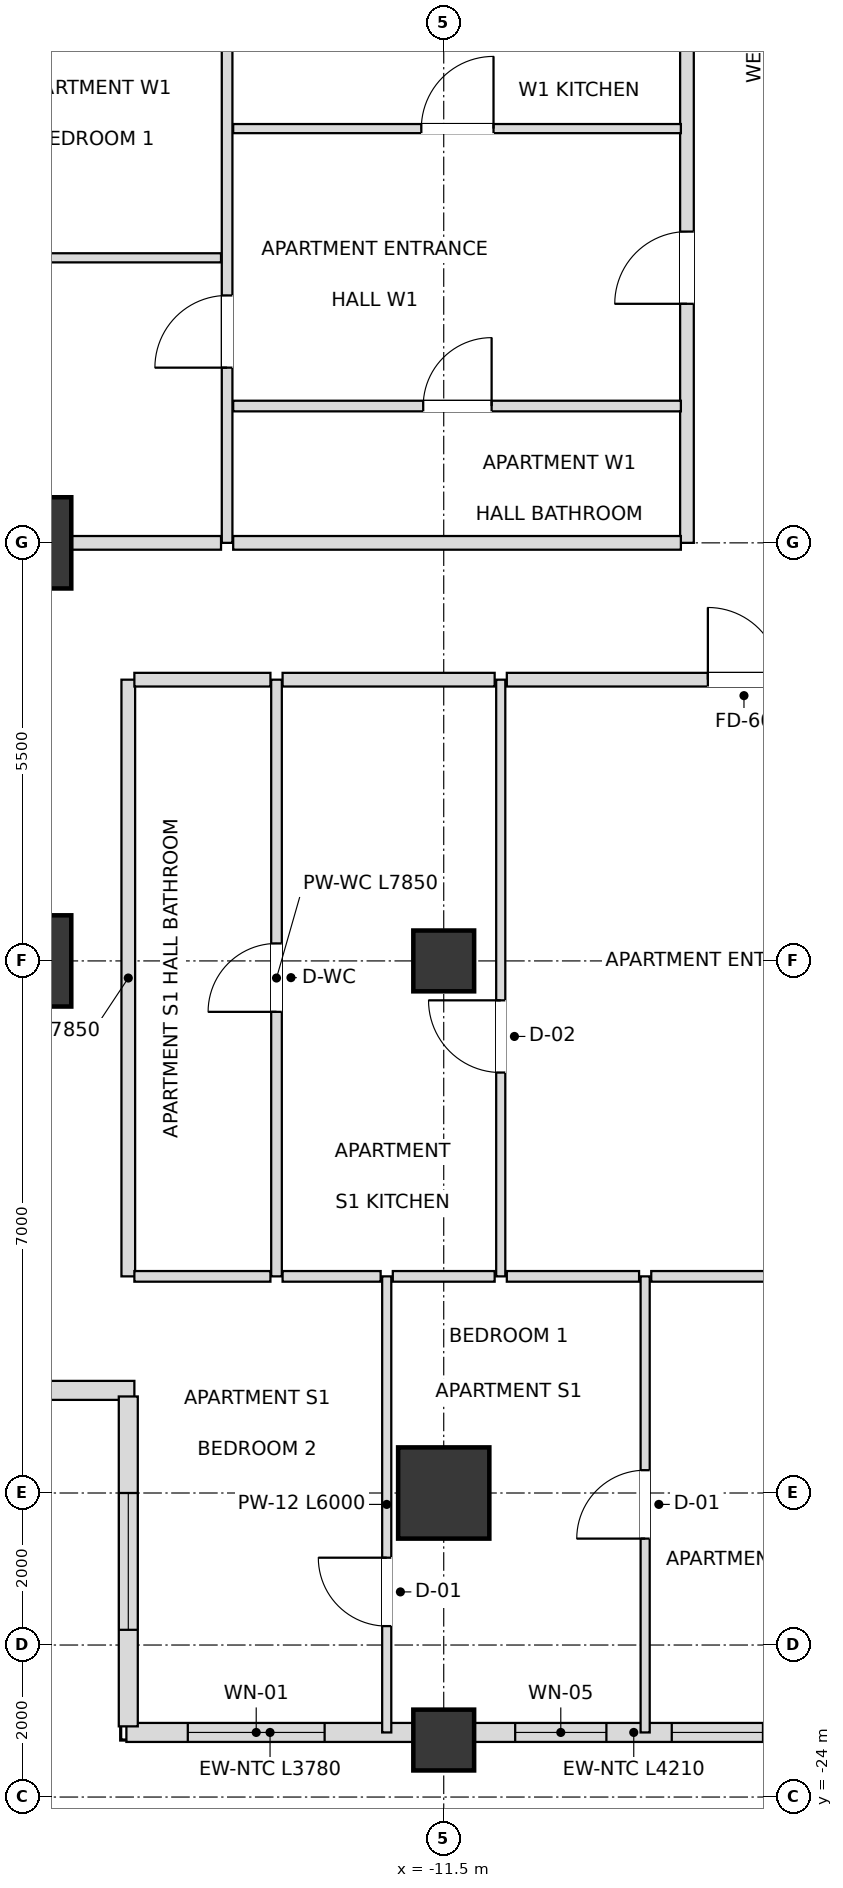
"""IFC4 building model, lengths in metres.
Left out: names, types, materials, properties, quantities, classifications, styles, units other than length and angle.
Written with IfcOpenShell. Run it as: python <this file> out.ifc"""

import sys

from ifc_helpers import new_model, si_unit, direction, frame, frame_2d, origin, origin_2d, place, context, subcontext, project, spatial, rectangle, extrude, element, fill, save


model = new_model("IFC4")
c1 = context("Model", 3, precision=1e-05, world=origin(), true_north=direction((0.0, 1.0)))
c2 = subcontext(c1, "Body", "Model", "MODEL_VIEW")
j1 = project(units=[si_unit("LENGTHUNIT", "METRE"), si_unit("PLANEANGLEUNIT", "RADIAN")], contexts=[c1])
p1 = place(None, origin())
s1 = spatial("IfcSite", under=j1, at=p1, CompositionType="ELEMENT")
p2 = place(p1, origin())
s2 = spatial("IfcBuilding", under=s1, at=p2, CompositionType="ELEMENT")
p3 = place(p2, frame((0.0, 0.0, 117.0)))
s3 = spatial("IfcBuildingStorey", under=s2, at=p3, CompositionType="ELEMENT", Elevation=117.0)
for number, where, z_axis, x_axis in (
    (1, (-11.5, -20.0, 0.0), (0.0, 0.0, 1.0), (1.0, 0.0, 0.0)),
    (2, (-17.0, -7.5, 0.0), (0.0, 0.0, 1.0), (1.0, 0.0, 0.0)),
    (3, (-17.0, -13.0, 0.0), (0.0, 0.0, 1.0), (1.0, 0.0, 0.0)),
):
    element("IfcColumn", number, at=place(p3, frame(where, z_axis=z_axis, x_axis=x_axis)), inside=s3, PredefinedType="USERDEFINED", context=c2, shape_type="SweptSolid", body=[
        extrude(rectangle(XDim=1.2, YDim=1.2, at=origin_2d()), origin(), (0.0, 0.0, 1.0), 3.6),
    ])
for number, where, z_axis, x_axis in (
    (4, (-11.5, -13.0, 0.0), (0.0, 0.0, 1.0), (1.0, 0.0, 0.0)),
    (5, (-11.5, -23.25, 0.0), (0.0, 0.0, 1.0), (1.0, 0.0, 0.0)),
):
    element("IfcColumn", number, at=place(p3, frame(where, z_axis=z_axis, x_axis=x_axis)), inside=s3, PredefinedType="COLUMN", context=c2, shape_type="SweptSolid", body=[
        extrude(rectangle(XDim=0.8, YDim=0.8, at=origin_2d()), origin(), (0.0, 0.0, 1.0), 3.6),
    ])
p4 = place(p3, frame((-15.675, -23.15, 0.0), z_axis=(0.0, 0.0, 1.0), x_axis=(1.0, 0.0, 0.0)))
e6 = element("IfcWall", 6, at=p4, inside=s3, PredefinedType="SOLIDWALL", context=c2, shape_type="SweptSolid", body=[
    extrude(rectangle(XDim=3.78, YDim=0.25, at=frame_2d((1.89, 0.0))), origin(), (0.0, 0.0, 1.0), 2.656),
])
p5 = place(p4, frame((0.808, 0.0, 0.72)))
e7 = element("IfcOpeningElement", 7, at=p5, cuts=e6, PredefinedType="OPENING", context=c2, shape_type="SweptSolid", body=[
    extrude(rectangle(XDim=1.8, YDim=1.68, at=frame_2d((0.9, 0.84))), frame((0.0, 0.135, 0.0), z_axis=(0.0, -1.0, 0.0), x_axis=(1.0, 0.0, 0.0)), (0.0, 0.0, 1.0), 0.27),
])
p6 = place(p3, frame((-11.105, -23.15, 0.0), z_axis=(0.0, 0.0, 1.0), x_axis=(1.0, 0.0, 0.0)))
e8 = element("IfcWall", 8, at=p6, inside=s3, PredefinedType="SOLIDWALL", context=c2, shape_type="SweptSolid", body=[
    extrude(rectangle(XDim=4.21, YDim=0.25, at=frame_2d((2.105, 0.0))), origin(), (0.0, 0.0, 1.0), 2.656),
])
p7 = place(p6, frame((0.545, 0.0, 0.72)))
e9 = element("IfcOpeningElement", 9, at=p7, cuts=e8, PredefinedType="OPENING", context=c2, shape_type="SweptSolid", body=[
    extrude(rectangle(XDim=1.2, YDim=1.68, at=frame_2d((0.6, 0.84))), frame((0.0, 0.135, 0.0), z_axis=(0.0, -1.0, 0.0), x_axis=(1.0, 0.0, 0.0)), (0.0, 0.0, 1.0), 0.27),
])
p8 = place(p6, frame((2.605, 0.0, 0.72)))
e10 = element("IfcOpeningElement", 10, at=p8, cuts=e8, PredefinedType="OPENING", context=c2, shape_type="SweptSolid", body=[
    extrude(rectangle(XDim=1.2, YDim=1.68, at=frame_2d((0.6, 0.84))), frame((0.0, 0.135, 0.0), z_axis=(0.0, -1.0, 0.0), x_axis=(1.0, 0.0, 0.0)), (0.0, 0.0, 1.0), 0.27),
])
p9 = place(p3, frame((-20.23, -18.65, 0.0), z_axis=(0.0, 0.0, 1.0), x_axis=(1.0, 0.0, 0.0)))
e11 = element("IfcWall", 11, at=p9, inside=s3, PredefinedType="SOLIDWALL", context=c2, shape_type="SweptSolid", body=[
    extrude(rectangle(XDim=4.66, YDim=0.25, at=frame_2d((2.33, 0.0))), origin(), (0.0, 0.0, 1.0), 2.656),
])
p10 = place(p9, frame((1.43, 0.0, 0.72)))
e12 = element("IfcOpeningElement", 12, at=p10, cuts=e11, PredefinedType="OPENING", context=c2, shape_type="SweptSolid", body=[
    extrude(rectangle(XDim=1.8, YDim=1.68, at=frame_2d((0.9, 0.84))), frame((0.0, 0.135, 0.0), z_axis=(0.0, -1.0, 0.0), x_axis=(1.0, 0.0, 0.0)), (0.0, 0.0, 1.0), 0.27),
])
p11 = place(p3, frame((-15.65, -18.73, 0.0), z_axis=(0.0, 0.0, 1.0), x_axis=(0.0, -1.0, 0.0)))
e13 = element("IfcWall", 13, at=p11, inside=s3, PredefinedType="SOLIDWALL", context=c2, shape_type="SweptSolid", body=[
    extrude(rectangle(XDim=4.34, YDim=0.25, at=frame_2d((2.17, 0.0))), origin(), (0.0, 0.0, 1.0), 2.656),
])
p12 = place(p11, frame((1.27, 0.0, 0.72)))
e14 = element("IfcOpeningElement", 14, at=p12, cuts=e13, PredefinedType="OPENING", context=c2, shape_type="SweptSolid", body=[
    extrude(rectangle(XDim=1.8, YDim=1.68, at=frame_2d((0.9, 0.84))), frame((0.0, 0.135, 0.0), z_axis=(0.0, -1.0, 0.0), x_axis=(1.0, 0.0, 0.0)), (0.0, 0.0, 1.0), 0.27),
])
p13 = place(p3, frame((-15.65, -17.15, 0.0), z_axis=(0.0, 0.0, 1.0), x_axis=(0.0, 1.0, 0.0)))
e15 = element("IfcWall", 15, at=p13, inside=s3, PredefinedType="PARTITIONING", context=c2, shape_type="SweptSolid", body=[
    extrude(rectangle(XDim=7.85, YDim=0.18, at=frame_2d((3.925, 0.0))), origin(), (0.0, 0.0, 1.0), 2.656),
])
p14 = place(p3, frame((-14.35, -7.5, 0.0), z_axis=(0.0, 0.0, 1.0), x_axis=(0.0, 1.0, 0.0)))
e16 = element("IfcWall", 16, at=p14, inside=s3, PredefinedType="PARTITIONING", context=c2, shape_type="SweptSolid", body=[
    extrude(rectangle(XDim=15.0, YDim=0.14, at=frame_2d((7.5, 0.0))), origin(), (0.0, 0.0, 1.0), 3.3),
])
p15 = place(p14, frame((2.305, 0.0, 0.0)))
e17 = element("IfcOpeningElement", 17, at=p15, cuts=e16, PredefinedType="OPENING", context=c2, shape_type="SweptSolid", body=[
    extrude(rectangle(XDim=0.95, YDim=2.1, at=frame_2d((0.475, 1.05))), frame((0.0, 0.08, 0.0), z_axis=(0.0, -1.0, 0.0), x_axis=(1.0, 0.0, 0.0)), (0.0, 0.0, 1.0), 0.16),
])
p16 = place(p14, frame((9.795, 0.0, 0.0)))
e18 = element("IfcOpeningElement", 18, at=p16, cuts=e16, PredefinedType="OPENING", context=c2, shape_type="SweptSolid", body=[
    extrude(rectangle(XDim=0.95, YDim=2.1, at=frame_2d((0.475, 1.05))), frame((0.0, 0.08, 0.0), z_axis=(0.0, -1.0, 0.0), x_axis=(1.0, 0.0, 0.0)), (0.0, 0.0, 1.0), 0.16),
])
p17 = place(p3, frame((-13.7, -17.15, 0.0), z_axis=(0.0, 0.0, 1.0), x_axis=(0.0, 1.0, 0.0)))
e19 = element("IfcWall", 19, at=p17, inside=s3, PredefinedType="PARTITIONING", context=c2, shape_type="SweptSolid", body=[
    extrude(rectangle(XDim=7.85, YDim=0.14, at=frame_2d((3.925, 0.0))), origin(), (0.0, 0.0, 1.0), 2.656),
])
p18 = place(p17, frame((3.48, 0.0, 0.0)))
e20 = element("IfcOpeningElement", 20, at=p18, cuts=e19, PredefinedType="OPENING", context=c2, shape_type="SweptSolid", body=[
    extrude(rectangle(XDim=0.9, YDim=2.1, at=frame_2d((0.45, 1.05))), frame((0.0, 0.08, 0.0), z_axis=(0.0, -1.0, 0.0), x_axis=(1.0, 0.0, 0.0)), (0.0, 0.0, 1.0), 0.16),
])
p19 = place(p3, frame((-12.25, -23.15, 0.0), z_axis=(0.0, 0.0, 1.0), x_axis=(0.0, 1.0, 0.0)))
e21 = element("IfcWall", 21, at=p19, inside=s3, PredefinedType="PARTITIONING", context=c2, shape_type="SweptSolid", body=[
    extrude(rectangle(XDim=6.0, YDim=0.12, at=frame_2d((3.0, 0.0))), origin(), (0.0, 0.0, 1.0), 2.656),
])
p20 = place(p19, frame((1.399, 0.0, 0.0)))
e22 = element("IfcOpeningElement", 22, at=p20, cuts=e21, PredefinedType="OPENING", context=c2, shape_type="SweptSolid", body=[
    extrude(rectangle(XDim=0.9, YDim=2.1, at=frame_2d((0.45, 1.05))), frame((0.0, 0.07, 0.0), z_axis=(0.0, -1.0, 0.0), x_axis=(1.0, 0.0, 0.0)), (0.0, 0.0, 1.0), 0.14),
])
p21 = place(p3, frame((-10.75, -17.15, 0.0), z_axis=(0.0, 0.0, 1.0), x_axis=(0.0, 1.0, 0.0)))
e23 = element("IfcWall", 23, at=p21, inside=s3, PredefinedType="PARTITIONING", context=c2, shape_type="SweptSolid", body=[
    extrude(rectangle(XDim=7.85, YDim=0.12, at=frame_2d((3.925, 0.0))), origin(), (0.0, 0.0, 1.0), 2.736),
])
p22 = place(p21, frame((2.681, 0.0, 0.0)))
e24 = element("IfcOpeningElement", 24, at=p22, cuts=e23, PredefinedType="OPENING", context=c2, shape_type="SweptSolid", body=[
    extrude(rectangle(XDim=0.95, YDim=2.1, at=frame_2d((0.475, 1.05))), frame((0.0, 0.07, 0.0), z_axis=(0.0, -1.0, 0.0), x_axis=(1.0, 0.0, 0.0)), (0.0, 0.0, 1.0), 0.14),
])
p23 = place(p3, frame((-8.85, -23.15, 0.0), z_axis=(0.0, 0.0, 1.0), x_axis=(0.0, 1.0, 0.0)))
e25 = element("IfcWall", 25, at=p23, inside=s3, PredefinedType="PARTITIONING", context=c2, shape_type="SweptSolid", body=[
    extrude(rectangle(XDim=6.0, YDim=0.12, at=frame_2d((3.0, 0.0))), origin(), (0.0, 0.0, 1.0), 2.736),
])
p24 = place(p23, frame((2.55, 0.0, 0.0)))
e26 = element("IfcOpeningElement", 26, at=p24, cuts=e25, PredefinedType="OPENING", context=c2, shape_type="SweptSolid", body=[
    extrude(rectangle(XDim=0.9, YDim=2.1, at=frame_2d((0.45, 1.05))), frame((0.0, 0.07, 0.0), z_axis=(0.0, -1.0, 0.0), x_axis=(1.0, 0.0, 0.0)), (0.0, 0.0, 1.0), 0.14),
])
p25 = place(p3, frame((-8.3, -7.5, 0.0), z_axis=(0.0, 0.0, 1.0), x_axis=(0.0, 1.0, 0.0)))
e27 = element("IfcWall", 27, at=p25, inside=s3, PredefinedType="PARTITIONING", context=c2, shape_type="SweptSolid", body=[
    extrude(rectangle(XDim=15.0, YDim=0.18, at=frame_2d((7.5, 0.0))), origin(), (0.0, 0.0, 1.0), 3.3),
])
p26 = place(p25, frame((3.145, 0.0, 0.0)))
e28 = element("IfcOpeningElement", 28, at=p26, cuts=e27, PredefinedType="OPENING", context=c2, shape_type="SweptSolid", body=[
    extrude(rectangle(XDim=0.95, YDim=2.15, at=frame_2d((0.475, 1.075))), frame((0.0, 0.1, 0.0), z_axis=(0.0, -1.0, 0.0), x_axis=(1.0, 0.0, 0.0)), (0.0, 0.0, 1.0), 0.2),
])
p27 = place(p25, frame((10.645, 0.0, 0.0)))
e29 = element("IfcOpeningElement", 29, at=p27, cuts=e27, PredefinedType="OPENING", context=c2, shape_type="SweptSolid", body=[
    extrude(rectangle(XDim=0.95, YDim=2.15, at=frame_2d((0.475, 1.075))), frame((0.0, 0.1, 0.0), z_axis=(0.0, -1.0, 0.0), x_axis=(1.0, 0.0, 0.0)), (0.0, 0.0, 1.0), 0.2),
])
p28 = place(p3, frame((-15.57, -17.15, 0.0), z_axis=(0.0, 0.0, 1.0), x_axis=(1.0, 0.0, 0.0)))
e30 = element("IfcWall", 30, at=p28, inside=s3, PredefinedType="PARTITIONING", context=c2, shape_type="SweptSolid", body=[
    extrude(rectangle(XDim=1.79, YDim=0.14, at=frame_2d((0.895, 0.0))), origin(), (0.0, 0.0, 1.0), 2.656),
])
p29 = place(p3, frame((-13.62, -17.15, 0.0), z_axis=(0.0, 0.0, 1.0), x_axis=(1.0, 0.0, 0.0)))
e31 = element("IfcWall", 31, at=p29, inside=s3, PredefinedType="PARTITIONING", context=c2, shape_type="SweptSolid", body=[
    extrude(rectangle(XDim=1.29, YDim=0.14, at=frame_2d((0.645, 0.0))), origin(), (0.0, 0.0, 1.0), 2.656),
])
p30 = place(p3, frame((-12.17, -17.15, 0.0), z_axis=(0.0, 0.0, 1.0), x_axis=(1.0, 0.0, 0.0)))
e32 = element("IfcWall", 32, at=p30, inside=s3, PredefinedType="PARTITIONING", context=c2, shape_type="SweptSolid", body=[
    extrude(rectangle(XDim=1.34, YDim=0.14, at=frame_2d((0.67, 0.0))), origin(), (0.0, 0.0, 1.0), 2.656),
])
p31 = place(p3, frame((-10.67, -17.15, 0.0), z_axis=(0.0, 0.0, 1.0), x_axis=(1.0, 0.0, 0.0)))
e33 = element("IfcWall", 33, at=p31, inside=s3, PredefinedType="PARTITIONING", context=c2, shape_type="SweptSolid", body=[
    extrude(rectangle(XDim=1.74, YDim=0.14, at=frame_2d((0.87, 0.0))), origin(), (0.0, 0.0, 1.0), 3.3),
])
p32 = place(p3, frame((-8.77, -17.15, 0.0), z_axis=(0.0, 0.0, 1.0), x_axis=(1.0, 0.0, 0.0)))
e34 = element("IfcWall", 34, at=p32, inside=s3, PredefinedType="PARTITIONING", context=c2, shape_type="SweptSolid", body=[
    extrude(rectangle(XDim=4.34, YDim=0.14, at=frame_2d((2.17, 0.0))), origin(), (0.0, 0.0, 1.0), 2.736),
])
p33 = place(p32, frame((1.695, 0.0, 0.0)))
e35 = element("IfcOpeningElement", 35, at=p33, cuts=e34, PredefinedType="OPENING", context=c2, shape_type="SweptSolid", body=[
    extrude(rectangle(XDim=0.95, YDim=2.1, at=frame_2d((0.475, 1.05))), frame((0.0, 0.08, 0.0), z_axis=(0.0, -1.0, 0.0), x_axis=(1.0, 0.0, 0.0)), (0.0, 0.0, 1.0), 0.16),
])
p34 = place(p3, frame((-15.57, -9.3, 0.0), z_axis=(0.0, 0.0, 1.0), x_axis=(1.0, 0.0, 0.0)))
e36 = element("IfcWall", 36, at=p34, inside=s3, PredefinedType="PARTITIONING", context=c2, shape_type="SweptSolid", body=[
    extrude(rectangle(XDim=1.79, YDim=0.18, at=frame_2d((0.895, 0.0))), origin(), (0.0, 0.0, 1.0), 3.3),
])
p35 = place(p3, frame((-13.62, -9.3, 0.0), z_axis=(0.0, 0.0, 1.0), x_axis=(1.0, 0.0, 0.0)))
e37 = element("IfcWall", 37, at=p35, inside=s3, PredefinedType="PARTITIONING", context=c2, shape_type="SweptSolid", body=[
    extrude(rectangle(XDim=2.79, YDim=0.18, at=frame_2d((1.395, 0.0))), origin(), (0.0, 0.0, 1.0), 3.3),
])
p36 = place(p3, frame((-10.67, -9.3, 0.0), z_axis=(0.0, 0.0, 1.0), x_axis=(1.0, 0.0, 0.0)))
e38 = element("IfcWall", 38, at=p36, inside=s3, PredefinedType="PARTITIONING", context=c2, shape_type="SweptSolid", body=[
    extrude(rectangle(XDim=6.24, YDim=0.18, at=frame_2d((3.12, 0.0))), origin(), (0.0, 0.0, 1.0), 2.736),
])
p37 = place(p36, frame((2.645, 0.0, 0.0)))
e39 = element("IfcOpeningElement", 39, at=p37, cuts=e38, PredefinedType="OPENING", context=c2, shape_type="SweptSolid", body=[
    extrude(rectangle(XDim=0.95, YDim=2.15, at=frame_2d((0.475, 1.075))), frame((0.0, 0.1, 0.0), z_axis=(0.0, -1.0, 0.0), x_axis=(1.0, 0.0, 0.0)), (0.0, 0.0, 1.0), 0.2),
])
p38 = place(p3, frame((-20.15, -7.5, 0.0), z_axis=(0.0, 0.0, 1.0), x_axis=(1.0, 0.0, 0.0)))
e40 = element("IfcWall", 40, at=p38, inside=s3, PredefinedType="PARTITIONING", context=c2, shape_type="SweptSolid", body=[
    extrude(rectangle(XDim=5.72, YDim=0.18, at=frame_2d((2.86, 0.0))), origin(), (0.0, 0.0, 1.0), 2.736),
])
p39 = place(p3, frame((-14.27, -7.5, 0.0), z_axis=(0.0, 0.0, 1.0), x_axis=(1.0, 0.0, 0.0)))
e41 = element("IfcWall", 41, at=p39, inside=s3, PredefinedType="PARTITIONING", context=c2, shape_type="SweptSolid", body=[
    extrude(rectangle(XDim=5.89, YDim=0.18, at=frame_2d((2.945, 0.0))), origin(), (0.0, 0.0, 1.0), 2.736),
])
p40 = place(p3, frame((-14.27, -5.7, 0.0), z_axis=(0.0, 0.0, 1.0), x_axis=(1.0, 0.0, 0.0)))
e42 = element("IfcWall", 42, at=p40, inside=s3, PredefinedType="PARTITIONING", context=c2, shape_type="SweptSolid", body=[
    extrude(rectangle(XDim=5.89, YDim=0.14, at=frame_2d((2.945, 0.0))), origin(), (0.0, 0.0, 1.0), 3.3),
])
p41 = place(p40, frame((2.5, 0.0, 0.0)))
e43 = element("IfcOpeningElement", 43, at=p41, cuts=e42, PredefinedType="OPENING", context=c2, shape_type="SweptSolid", body=[
    extrude(rectangle(XDim=0.9, YDim=2.1, at=frame_2d((0.45, 1.05))), frame((0.0, 0.08, 0.0), z_axis=(0.0, -1.0, 0.0), x_axis=(1.0, 0.0, 0.0)), (0.0, 0.0, 1.0), 0.16),
])
p42 = place(p3, frame((-20.07, -3.75, 0.0), z_axis=(0.0, 0.0, 1.0), x_axis=(1.0, 0.0, 0.0)))
e44 = element("IfcWall", 44, at=p42, inside=s3, PredefinedType="PARTITIONING", context=c2, shape_type="SweptSolid", body=[
    extrude(rectangle(XDim=5.64, YDim=0.12, at=frame_2d((2.82, 0.0))), origin(), (0.0, 0.0, 1.0), 2.736),
])
p43 = place(p42, frame((2.37, 0.0, 0.0)))
e45 = element("IfcOpeningElement", 45, at=p43, cuts=e44, PredefinedType="OPENING", context=c2, shape_type="SweptSolid", body=[
    extrude(rectangle(XDim=0.9, YDim=2.1, at=frame_2d((0.45, 1.05))), frame((0.0, 0.07, 0.0), z_axis=(0.0, -1.0, 0.0), x_axis=(1.0, 0.0, 0.0)), (0.0, 0.0, 1.0), 0.14),
])
p44 = place(p3, frame((-14.27, -2.05, 0.0), z_axis=(0.0, 0.0, 1.0), x_axis=(1.0, 0.0, 0.0)))
e46 = element("IfcWall", 46, at=p44, inside=s3, PredefinedType="PARTITIONING", context=c2, shape_type="SweptSolid", body=[
    extrude(rectangle(XDim=5.89, YDim=0.12, at=frame_2d((2.945, 0.0))), origin(), (0.0, 0.0, 1.0), 3.3),
])
p45 = place(p44, frame((2.475, 0.0, 0.0)))
e47 = element("IfcOpeningElement", 47, at=p45, cuts=e46, PredefinedType="OPENING", context=c2, shape_type="SweptSolid", body=[
    extrude(rectangle(XDim=0.95, YDim=2.1, at=frame_2d((0.475, 1.05))), frame((0.0, 0.07, 0.0), z_axis=(0.0, -1.0, 0.0), x_axis=(1.0, 0.0, 0.0)), (0.0, 0.0, 1.0), 0.14),
])
p46 = place(p5, origin())
e48 = element("IfcWindow", 48, at=p46, inside=s3, PartitioningType="SINGLE_PANEL", PredefinedType="WINDOW", context=c2, shape_type="SweptSolid", body=[
    extrude(rectangle(XDim=1.8, YDim=1.68, at=frame_2d((0.9, 0.84))), frame((0.0, 0.03, 0.0), z_axis=(0.0, -1.0, 0.0), x_axis=(1.0, 0.0, 0.0)), (0.0, 0.0, 1.0), 0.06),
])
fill(e7, e48)
p47 = place(p7, origin())
e49 = element("IfcWindow", 49, at=p47, inside=s3, PartitioningType="SINGLE_PANEL", PredefinedType="WINDOW", context=c2, shape_type="SweptSolid", body=[
    extrude(rectangle(XDim=1.2, YDim=1.68, at=frame_2d((0.6, 0.84))), frame((0.0, 0.03, 0.0), z_axis=(0.0, -1.0, 0.0), x_axis=(1.0, 0.0, 0.0)), (0.0, 0.0, 1.0), 0.06),
])
fill(e9, e49)
p48 = place(p8, origin())
e50 = element("IfcWindow", 50, at=p48, inside=s3, PartitioningType="SINGLE_PANEL", PredefinedType="WINDOW", context=c2, shape_type="SweptSolid", body=[
    extrude(rectangle(XDim=1.2, YDim=1.68, at=frame_2d((0.6, 0.84))), frame((0.0, 0.03, 0.0), z_axis=(0.0, -1.0, 0.0), x_axis=(1.0, 0.0, 0.0)), (0.0, 0.0, 1.0), 0.06),
])
fill(e10, e50)
p49 = place(p12, origin())
e51 = element("IfcWindow", 51, at=p49, inside=s3, PartitioningType="SINGLE_PANEL", PredefinedType="WINDOW", context=c2, shape_type="SweptSolid", body=[
    extrude(rectangle(XDim=1.8, YDim=1.68, at=frame_2d((0.9, 0.84))), frame((0.0, 0.03, 0.0), z_axis=(0.0, -1.0, 0.0), x_axis=(1.0, 0.0, 0.0)), (0.0, 0.0, 1.0), 0.06),
])
fill(e14, e51)
p50 = place(p37, origin())
e52 = element("IfcDoor", 52, at=p50, inside=s3, OperationType="SINGLE_SWING_LEFT", PredefinedType="DOOR", context=c2, shape_type="SweptSolid", body=[
    extrude(rectangle(XDim=0.95, YDim=2.15, at=frame_2d((0.475, 1.075))), frame((0.0, 0.025, 0.0), z_axis=(0.0, -1.0, 0.0), x_axis=(1.0, 0.0, 0.0)), (0.0, 0.0, 1.0), 0.05),
])
fill(e39, e52)
p51 = place(p22, origin())
e53 = element("IfcDoor", 53, at=p51, inside=s3, OperationType="SINGLE_SWING_RIGHT", PredefinedType="DOOR", context=c2, shape_type="SweptSolid", body=[
    extrude(rectangle(XDim=0.95, YDim=2.1, at=frame_2d((0.475, 1.05))), frame((0.0, 0.025, 0.0), z_axis=(0.0, -1.0, 0.0), x_axis=(1.0, 0.0, 0.0)), (0.0, 0.0, 1.0), 0.05),
])
fill(e24, e53)
p52 = place(p18, origin())
e54 = element("IfcDoor", 54, at=p52, inside=s3, OperationType="SINGLE_SWING_LEFT", PredefinedType="DOOR", context=c2, shape_type="SweptSolid", body=[
    extrude(rectangle(XDim=0.9, YDim=2.1, at=frame_2d((0.45, 1.05))), frame((0.0, 0.025, 0.0), z_axis=(0.0, -1.0, 0.0), x_axis=(1.0, 0.0, 0.0)), (0.0, 0.0, 1.0), 0.05),
])
fill(e20, e54)
p53 = place(p24, origin())
e55 = element("IfcDoor", 55, at=p53, inside=s3, OperationType="SINGLE_SWING_LEFT", PredefinedType="DOOR", context=c2, shape_type="SweptSolid", body=[
    extrude(rectangle(XDim=0.9, YDim=2.1, at=frame_2d((0.45, 1.05))), frame((0.0, 0.025, 0.0), z_axis=(0.0, -1.0, 0.0), x_axis=(1.0, 0.0, 0.0)), (0.0, 0.0, 1.0), 0.05),
])
fill(e26, e55)
p54 = place(p20, origin())
e56 = element("IfcDoor", 56, at=p54, inside=s3, OperationType="SINGLE_SWING_RIGHT", PredefinedType="DOOR", context=c2, shape_type="SweptSolid", body=[
    extrude(rectangle(XDim=0.9, YDim=2.1, at=frame_2d((0.45, 1.05))), frame((0.0, 0.025, 0.0), z_axis=(0.0, -1.0, 0.0), x_axis=(1.0, 0.0, 0.0)), (0.0, 0.0, 1.0), 0.05),
])
fill(e22, e56)
p55 = place(p41, origin())
e57 = element("IfcDoor", 57, at=p55, inside=s3, OperationType="SINGLE_SWING_RIGHT", PredefinedType="DOOR", context=c2, shape_type="SweptSolid", body=[
    extrude(rectangle(XDim=0.9, YDim=2.1, at=frame_2d((0.45, 1.05))), frame((0.0, 0.025, 0.0), z_axis=(0.0, -1.0, 0.0), x_axis=(1.0, 0.0, 0.0)), (0.0, 0.0, 1.0), 0.05),
])
fill(e43, e57)
p56 = place(p26, origin())
e58 = element("IfcDoor", 58, at=p56, inside=s3, OperationType="SINGLE_SWING_LEFT", PredefinedType="DOOR", context=c2, shape_type="SweptSolid", body=[
    extrude(rectangle(XDim=0.95, YDim=2.15, at=frame_2d((0.475, 1.075))), frame((0.0, 0.025, 0.0), z_axis=(0.0, -1.0, 0.0), x_axis=(1.0, 0.0, 0.0)), (0.0, 0.0, 1.0), 0.05),
])
fill(e28, e58)
p57 = place(p45, origin())
e59 = element("IfcDoor", 59, at=p57, inside=s3, OperationType="SINGLE_SWING_RIGHT", PredefinedType="DOOR", context=c2, shape_type="SweptSolid", body=[
    extrude(rectangle(XDim=0.95, YDim=2.1, at=frame_2d((0.475, 1.05))), frame((0.0, 0.025, 0.0), z_axis=(0.0, -1.0, 0.0), x_axis=(1.0, 0.0, 0.0)), (0.0, 0.0, 1.0), 0.05),
])
fill(e47, e59)
p58 = place(p15, origin())
e60 = element("IfcDoor", 60, at=p58, inside=s3, OperationType="SINGLE_SWING_LEFT", PredefinedType="DOOR", context=c2, shape_type="SweptSolid", body=[
    extrude(rectangle(XDim=0.95, YDim=2.1, at=frame_2d((0.475, 1.05))), frame((0.0, 0.025, 0.0), z_axis=(0.0, -1.0, 0.0), x_axis=(1.0, 0.0, 0.0)), (0.0, 0.0, 1.0), 0.05),
])
fill(e17, e60)
save(model, sys.argv[1])
